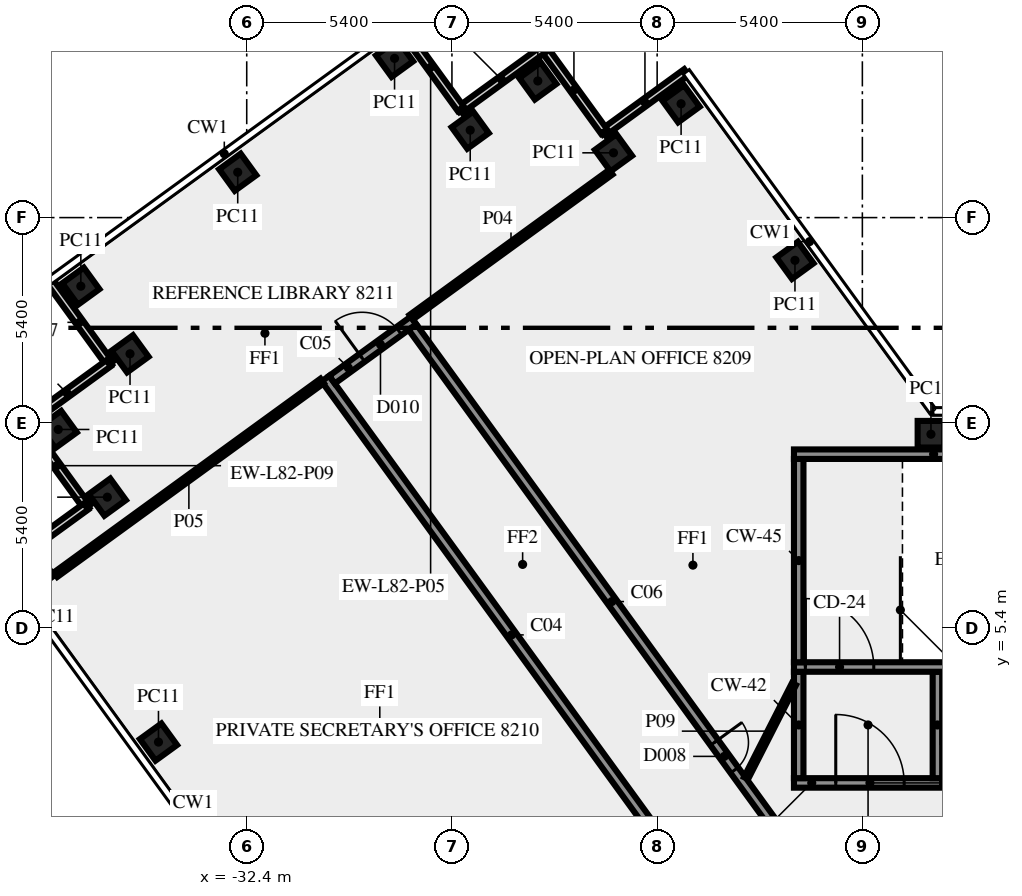
"""IFC4 building model, lengths in metres.
Left out: names, types, materials, properties, quantities, classifications, styles, units other than length and angle.
Written with IfcOpenShell. Run it as: python <this file> out.ifc"""

import sys

from ifc_helpers import new_model, si_unit, direction, frame, frame_2d, origin, origin_2d, place, context, subcontext, project, spatial, rectangle, extrude, element, fill, save


model = new_model("IFC4")
c1 = context("Model", 3, precision=1e-05, world=origin(), true_north=direction((0.0, 1.0)))
c2 = subcontext(c1, "Body", "Model", "MODEL_VIEW")
j1 = project(units=[si_unit("LENGTHUNIT", "METRE"), si_unit("PLANEANGLEUNIT", "RADIAN")], contexts=[c1])
p1 = place(None, origin())
s1 = spatial("IfcSite", under=j1, at=p1, CompositionType="ELEMENT")
p2 = place(p1, origin())
s2 = spatial("IfcBuilding", under=s1, at=p2, CompositionType="ELEMENT")
p3 = place(p2, frame((0.0, 0.0, 351.0)))
s3 = spatial("IfcBuildingStorey", under=s2, at=p3, CompositionType="ELEMENT", Elevation=351.0)
for number, where, z_axis, x_axis in (
    (1, (-17.974, 15.075, 0.0), (0.0, 0.0, 1.0), (-0.588, 0.809, 0.0)),
    (2, (-20.97, 19.195, 0.0), (0.0, 0.0, 1.0), (-0.588, 0.809, 0.0)),
    (3, (-22.749, 17.904, 0.0), (0.0, 0.0, 1.0), (-0.588, 0.809, 0.0)),
    (4, (-24.74, 19.795, 0.0), (0.0, 0.0, 1.0), (-0.588, 0.809, 0.0)),
    (5, (-26.519, 18.5, 0.0), (0.0, 0.0, 1.0), (-0.588, 0.809, 0.0)),
    (6, (-28.51, 20.39, 0.0), (0.0, 0.0, 1.0), (-0.809, -0.588, 0.0)),
    (7, (-32.637, 17.393, 0.0), (0.0, 0.0, 1.0), (-0.809, -0.588, 0.0)),
    (8, (-36.765, 14.395, 0.0), (0.0, 0.0, 1.0), (0.588, -0.809, 0.0)),
    (9, (-35.471, 12.616, 0.0), (0.0, 0.0, 1.0), (-0.809, -0.588, 0.0)),
    (10, (-37.36, 10.625, 0.0), (0.0, 0.0, 1.0), (0.588, -0.809, 0.0)),
    (11, (-36.068, 8.844, 0.0), (0.0, 0.0, 1.0), (0.588, -0.809, 0.0)),
    (12, (-37.96, 6.855, 0.0), (0.0, 0.0, 1.0), (0.588, -0.809, 0.0)),
    (13, (-34.722, 2.4, 0.0), (0.0, 0.0, 1.0), (0.588, -0.809, 0.0)),
    (14, (-14.395, 10.5, 0.0), (0.0, 0.0, 1.0), (-1.0, 0.0, 0.0)),
):
    element("IfcColumn", number, at=place(p3, frame(where, z_axis=z_axis, x_axis=x_axis)), inside=s3, PredefinedType="COLUMN", context=c2, shape_type="SweptSolid", body=[
        extrude(rectangle(XDim=0.7, YDim=0.7, at=origin_2d()), origin(), (0.0, 0.0, 1.0), 3.2),
    ])
for number, where, z_axis, x_axis in (
    (15, (-20.829, 20.025, 0.0), (0.0, 0.0, 1.0), (-0.809, -0.588, 0.0)),
    (16, (-22.996, 18.466, 0.0), (0.0, 0.0, 1.0), (-0.588, 0.809, 0.0)),
):
    element("IfcWall", number, at=place(p3, frame(where, z_axis=z_axis, x_axis=x_axis)), inside=s3, PredefinedType="SOLIDWALL", context=c2, shape_type="SweptSolid", body=[
        extrude(rectangle(XDim=2.7, YDim=0.2, at=frame_2d((1.35, 0.0))), origin(), (0.0, 0.0, 1.0), 3.2),
    ])
for number, where, z_axis, x_axis in (
    (17, (-24.6, 20.623, 0.0), (0.0, 0.0, 1.0), (-0.809, -0.588, 0.0)),
    (18, (-26.768, 19.063, 0.0), (0.0, 0.0, 1.0), (-0.588, 0.809, 0.0)),
):
    element("IfcWall", number, at=place(p3, frame(where, z_axis=z_axis, x_axis=x_axis)), inside=s3, PredefinedType="SOLIDWALL", context=c2, shape_type="SweptSolid", body=[
        extrude(rectangle(XDim=2.7, YDim=0.2, at=frame_2d((1.35, 0.0))), origin(), (0.0, 0.0, 1.0), 3.2),
    ])
for number, where, z_axis, x_axis in (
    (19, (-37.592, 14.536, 0.0), (0.0, 0.0, 1.0), (0.588, -0.809, 0.0)),
    (20, (-36.032, 12.369, 0.0), (0.0, 0.0, 1.0), (-0.809, -0.588, 0.0)),
    (21, (-38.189, 10.765, 0.0), (0.0, 0.0, 1.0), (0.588, -0.809, 0.0)),
    (22, (-36.629, 8.597, 0.0), (0.0, 0.0, 1.0), (-0.809, -0.588, 0.0)),
):
    element("IfcWall", number, at=place(p3, frame(where, z_axis=z_axis, x_axis=x_axis)), inside=s3, PredefinedType="SOLIDWALL", context=c2, shape_type="SweptSolid", body=[
        extrude(rectangle(XDim=2.7, YDim=0.2, at=frame_2d((1.35, 0.0))), origin(), (0.0, 0.0, 1.0), 3.2),
    ])
p4 = place(p3, frame((-18.0, 1.325, 0.0), z_axis=(0.0, 0.0, 1.0), x_axis=(1.0, 0.0, 0.0)))
e23 = element("IfcWall", 23, at=p4, inside=s3, PredefinedType="SHEAR", context=c2, shape_type="SweptSolid", body=[
    extrude(rectangle(XDim=3.9, YDim=0.25, at=frame_2d((1.95, 0.0))), origin(), (0.0, 0.0, 1.0), 3.2),
])
p5 = place(p4, frame((1.1, 0.0, 0.0)))
e24 = element("IfcOpeningElement", 24, at=p5, cuts=e23, PredefinedType="OPENING", context=c2, shape_type="SweptSolid", body=[
    extrude(rectangle(XDim=1.8, YDim=2.1, at=frame_2d((0.9, 1.05))), frame((0.0, 0.135, 0.0), z_axis=(0.0, -1.0, 0.0), x_axis=(1.0, 0.0, 0.0)), (0.0, 0.0, 1.0), 0.27),
])
for number, where, z_axis, x_axis in (
    (25, (-17.875, 1.45, 0.0), (0.0, 0.0, 1.0), (0.0, 1.0, 0.0)),
    (26, (-14.225, 1.45, 0.0), (0.0, 0.0, 1.0), (0.0, 1.0, 0.0)),
):
    element("IfcWall", number, at=place(p3, frame(where, z_axis=z_axis, x_axis=x_axis)), inside=s3, PredefinedType="SHEAR", context=c2, shape_type="SweptSolid", body=[
        extrude(rectangle(XDim=2.8, YDim=0.25, at=frame_2d((1.4, 0.0))), origin(), (0.0, 0.0, 1.0), 3.2),
    ])
p6 = place(p3, frame((-18.0, 4.375, 0.0), z_axis=(0.0, 0.0, 1.0), x_axis=(1.0, 0.0, 0.0)))
e27 = element("IfcWall", 27, at=p6, inside=s3, PredefinedType="SHEAR", context=c2, shape_type="SweptSolid", body=[
    extrude(rectangle(XDim=10.5, YDim=0.25, at=frame_2d((5.25, 0.0))), origin(), (0.0, 0.0, 1.0), 3.2),
])
p7 = place(p6, frame((0.3, 0.0, 0.0)))
e28 = element("IfcOpeningElement", 28, at=p7, cuts=e27, PredefinedType="OPENING", context=c2, shape_type="SweptSolid", body=[
    extrude(rectangle(XDim=1.8, YDim=2.1, at=frame_2d((0.9, 1.05))), frame((0.0, 0.135, 0.0), z_axis=(0.0, -1.0, 0.0), x_axis=(1.0, 0.0, 0.0)), (0.0, 0.0, 1.0), 0.27),
])
p8 = place(p3, frame((-17.875, 4.5, 0.0), z_axis=(0.0, 0.0, 1.0), x_axis=(0.0, 1.0, 0.0)))
e29 = element("IfcWall", 29, at=p8, inside=s3, PredefinedType="SHEAR", context=c2, shape_type="SweptSolid", body=[
    extrude(rectangle(XDim=5.35, YDim=0.25, at=frame_2d((2.675, 0.0))), origin(), (0.0, 0.0, 1.0), 3.2),
])
p9 = place(p3, frame((-18.0, 9.975, 0.0), z_axis=(0.0, 0.0, 1.0), x_axis=(1.0, 0.0, 0.0)))
e30 = element("IfcWall", 30, at=p9, inside=s3, PredefinedType="SHEAR", context=c2, shape_type="SweptSolid", body=[
    extrude(rectangle(XDim=10.5, YDim=0.25, at=frame_2d((5.25, 0.0))), origin(), (0.0, 0.0, 1.0), 3.2),
])
p10 = place(p9, frame((4.5, 0.0, 1.0)))
e31 = element("IfcOpeningElement", 31, at=p10, cuts=e30, PredefinedType="OPENING", context=c2, shape_type="SweptSolid", body=[
    extrude(rectangle(XDim=1.2, YDim=1.2, at=frame_2d((0.6, 0.6))), frame((0.0, 0.135, 0.0), z_axis=(0.0, -1.0, 0.0), x_axis=(1.0, 0.0, 0.0)), (0.0, 0.0, 1.0), 0.27),
])
p11 = place(p3, frame((-20.531, -1.523, 0.0), z_axis=(0.0, 0.0, 1.0), x_axis=(-0.587785867777, 0.809016547199, 0.0)))
e32 = element("IfcWall", 32, at=p11, inside=s3, PredefinedType="SOLIDWALL", context=c2, shape_type="SweptSolid", body=[
    extrude(rectangle(XDim=16.67, YDim=0.25, at=frame_2d((8.335, 0.0))), origin(), (0.0, 0.0, 1.0), 3.2),
])
p12 = place(p11, frame((0.533, 0.0, 0.0)))
e33 = element("IfcOpeningElement", 33, at=p12, cuts=e32, PredefinedType="OPENING", context=c2, shape_type="SweptSolid", body=[
    extrude(rectangle(XDim=0.9, YDim=2.1, at=frame_2d((0.45, 1.05))), frame((0.0, 0.135, 0.0), z_axis=(0.0, -1.0, 0.0), x_axis=(1.0, 0.0, 0.0)), (0.0, 0.0, 1.0), 0.27),
])
p13 = place(p3, frame((-30.155, 11.936, 0.0), z_axis=(0.0, 0.0, 1.0), x_axis=(0.809038743598, 0.587755315891, 0.0)))
e34 = element("IfcWall", 34, at=p13, inside=s3, PredefinedType="SOLIDWALL", context=c2, shape_type="SweptSolid", body=[
    extrude(rectangle(XDim=2.65, YDim=0.25, at=frame_2d((1.325, 0.0))), origin(), (0.0, 0.0, 1.0), 3.2),
])
p14 = place(p13, frame((0.976, 0.0, 0.0)))
e35 = element("IfcOpeningElement", 35, at=p14, cuts=e34, PredefinedType="OPENING", context=c2, shape_type="SweptSolid", body=[
    extrude(rectangle(XDim=1.2, YDim=2.1, at=frame_2d((0.6, 1.05))), frame((0.0, 0.135, 0.0), z_axis=(0.0, -1.0, 0.0), x_axis=(1.0, 0.0, 0.0)), (0.0, 0.0, 1.0), 0.27),
])
p15 = place(p3, frame((-28.039, 13.319, 0.0), z_axis=(0.0, 0.0, 1.0), x_axis=(0.587791911753, -0.809012155952, 0.0)))
e36 = element("IfcWall", 36, at=p15, inside=s3, PredefinedType="SOLIDWALL", context=c2, shape_type="SweptSolid", body=[
    extrude(rectangle(XDim=17.853, YDim=0.25, at=frame_2d((8.927, 0.0))), origin(), (0.0, 0.0, 1.0), 3.2),
])
p16 = place(p15, frame((13.512, 0.0, 0.0)))
e37 = element("IfcOpeningElement", 37, at=p16, cuts=e36, PredefinedType="OPENING", context=c2, shape_type="SweptSolid", body=[
    extrude(rectangle(XDim=0.9, YDim=2.1, at=frame_2d((0.45, 1.05))), frame((0.0, 0.135, 0.0), z_axis=(0.0, -1.0, 0.0), x_axis=(1.0, 0.0, 0.0)), (0.0, 0.0, 1.0), 0.27),
])
p17 = place(p3, frame((-22.818, 17.396, 0.0), z_axis=(0.0, 0.0, 1.0), x_axis=(-0.809000932727, -0.587807358619, 0.0)))
e38 = element("IfcWall", 38, at=p17, inside=s3, PredefinedType="PARTITIONING", context=c2, shape_type="SweptSolid", body=[
    extrude(rectangle(XDim=6.496, YDim=0.15, at=frame_2d((3.248, 0.0))), origin(), (0.0, 0.0, 1.0), 3.2),
])
p18 = place(p3, frame((-37.429, 6.805, 0.0), z_axis=(0.0, 0.0, 1.0), x_axis=(0.809020922653, 0.587779845444, 0.0)))
e39 = element("IfcWall", 39, at=p18, inside=s3, PredefinedType="PARTITIONING", context=c2, shape_type="SweptSolid", body=[
    extrude(rectangle(XDim=8.67, YDim=0.15, at=frame_2d((4.335, 0.0))), origin(), (0.0, 0.0, 1.0), 3.2),
])
p19 = place(p3, frame((-19.261, 1.45, 0.0), z_axis=(0.0, 0.0, 1.0), x_axis=(0.453950796792, 0.891026752736, 0.0)))
e40 = element("IfcWall", 40, at=p19, inside=s3, PredefinedType="PARTITIONING", context=c2, shape_type="SweptSolid", body=[
    extrude(rectangle(XDim=2.778, YDim=0.12, at=frame_2d((1.389, 0.0))), origin(), (0.0, 0.0, 1.0), 3.2),
])
p20 = place(p5, origin())
e41 = element("IfcDoor", 41, at=p20, inside=s3, OperationType="DOUBLE_DOOR_SINGLE_SWING", PredefinedType="DOOR", context=c2, shape_type="SweptSolid", body=[
    extrude(rectangle(XDim=1.8, YDim=2.1, at=frame_2d((0.9, 1.05))), frame((0.0, 0.025, 0.0), z_axis=(0.0, -1.0, 0.0), x_axis=(1.0, 0.0, 0.0)), (0.0, 0.0, 1.0), 0.05),
])
fill(e24, e41)
p21 = place(p7, origin())
e42 = element("IfcDoor", 42, at=p21, inside=s3, OperationType="DOUBLE_DOOR_SINGLE_SWING", PredefinedType="DOOR", context=c2, shape_type="SweptSolid", body=[
    extrude(rectangle(XDim=1.8, YDim=2.1, at=frame_2d((0.9, 1.05))), frame((0.0, 0.025, 0.0), z_axis=(0.0, -1.0, 0.0), x_axis=(1.0, 0.0, 0.0)), (0.0, 0.0, 1.0), 0.05),
])
fill(e28, e42)
p22 = place(p16, origin())
e43 = element("IfcDoor", 43, at=p22, inside=s3, OperationType="SINGLE_SWING_RIGHT", PredefinedType="DOOR", context=c2, shape_type="SweptSolid", body=[
    extrude(rectangle(XDim=0.9, YDim=2.1, at=frame_2d((0.45, 1.05))), frame((0.0, 0.025, 0.0), z_axis=(0.0, -1.0, 0.0), x_axis=(1.0, 0.0, 0.0)), (0.0, 0.0, 1.0), 0.05),
])
fill(e37, e43)
p23 = place(p14, origin())
e44 = element("IfcDoor", 44, at=p23, inside=s3, OperationType="SINGLE_SWING_RIGHT", PredefinedType="DOOR", context=c2, shape_type="SweptSolid", body=[
    extrude(rectangle(XDim=1.2, YDim=2.1, at=frame_2d((0.6, 1.05))), frame((0.0, 0.025, 0.0), z_axis=(0.0, -1.0, 0.0), x_axis=(1.0, 0.0, 0.0)), (0.0, 0.0, 1.0), 0.05),
])
fill(e35, e44)
save(model, sys.argv[1])
